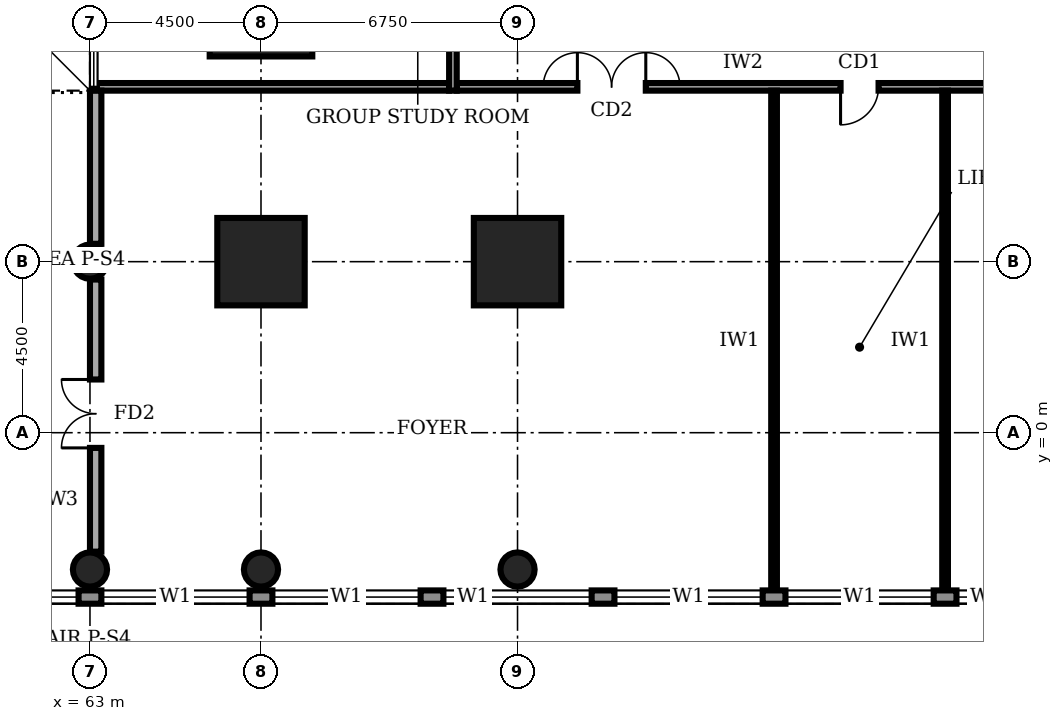
"""IFC4 building model, lengths in metres.
Left out: names, types, materials, properties, quantities, classifications, styles, units other than length and angle.
Written with IfcOpenShell. Run it as: python <this file> out.ifc"""

import sys

from ifc_helpers import new_model, si_unit, direction, frame, frame_2d, origin, origin_2d, place, context, subcontext, project, spatial, rectangle, circle, extrude, element, fill, save


model = new_model("IFC4")
c1 = context("Model", 3, precision=1e-05, world=origin(), true_north=direction((0.0, 1.0)))
c2 = subcontext(c1, "Body", "Model", "MODEL_VIEW")
j1 = project(units=[si_unit("LENGTHUNIT", "METRE"), si_unit("PLANEANGLEUNIT", "RADIAN")], contexts=[c1])
p1 = place(None, origin())
s1 = spatial("IfcSite", under=j1, at=p1, CompositionType="ELEMENT")
p2 = place(p1, origin())
s2 = spatial("IfcBuilding", under=s1, at=p2, CompositionType="ELEMENT")
p3 = place(p2, frame((0.0, 0.0, 11.0)))
s3 = spatial("IfcBuildingStorey", under=s2, at=p3, CompositionType="ELEMENT", Elevation=11.0)
for number, where, z_axis, x_axis in (
    (1, (67.5, 4.5, 0.0), (0.0, 0.0, 1.0), (1.0, 0.0, 0.0)),
    (2, (74.25, 4.5, 0.0), (0.0, 0.0, 1.0), (1.0, 0.0, 0.0)),
):
    element("IfcColumn", number, at=place(p3, frame(where, z_axis=z_axis, x_axis=x_axis)), inside=s3, PredefinedType="COLUMN", context=c2, shape_type="SweptSolid", body=[
        extrude(rectangle(XDim=2.3, YDim=2.3, at=origin_2d()), origin(), (0.0, 0.0, 1.0), 5.0),
    ])
p4 = place(p3, frame((67.5, 11.25, 0.0), z_axis=(0.0, 0.0, 1.0), x_axis=(1.0, 0.0, 0.0)))
e3 = element("IfcColumn", 3, at=p4, inside=s3, PredefinedType="COLUMN", context=c2, shape_type="SweptSolid", body=[
    extrude(rectangle(XDim=2.7, YDim=2.7, at=origin_2d()), origin(), (0.0, 0.0, 1.0), 5.0),
])
for number, where, z_axis, x_axis in (
    (4, (63.0, -3.6, 0.0), (0.0, 0.0, 1.0), (1.0, 0.0, 0.0)),
    (5, (67.5, -3.6, 0.0), (0.0, 0.0, 1.0), (1.0, 0.0, 0.0)),
    (6, (74.25, -3.6, 0.0), (0.0, 0.0, 1.0), (1.0, 0.0, 0.0)),
    (7, (63.0, 4.5, 0.0), (0.0, 0.0, 1.0), (1.0, 0.0, 0.0)),
):
    element("IfcColumn", number, at=place(p3, frame(where, z_axis=z_axis, x_axis=x_axis)), inside=s3, PredefinedType="COLUMN", context=c2, shape_type="SweptSolid", body=[
        extrude(circle(Radius=0.45, at=origin_2d()), origin(), (0.0, 0.0, 1.0), 5.0),
    ])
p5 = place(p3, frame((0.02, -4.325, 0.0), z_axis=(0.0, 0.0, 1.0), x_axis=(1.0, 0.0, 0.0)))
e8 = element("IfcWall", 8, at=p5, inside=s3, PredefinedType="STANDARD", context=c2, shape_type="SweptSolid", body=[
    extrude(rectangle(XDim=98.96, YDim=0.35, at=frame_2d((49.48, 0.0))), origin(), (0.0, 0.0, 1.0), 4.7),
])
p6 = place(p5, frame((4.78, 0.0, 0.9)))
e9 = element("IfcOpeningElement", 9, at=p6, cuts=e8, PredefinedType="OPENING", context=c2, shape_type="SweptSolid", body=[
    extrude(rectangle(XDim=3.9, YDim=2.2, at=frame_2d((1.95, 1.1))), frame((0.0, 0.185, 0.0), z_axis=(0.0, -1.0, 0.0), x_axis=(1.0, 0.0, 0.0)), (0.0, 0.0, 1.0), 0.37),
])
p7 = place(p5, frame((9.28, 0.0, 0.9)))
e10 = element("IfcOpeningElement", 10, at=p7, cuts=e8, PredefinedType="OPENING", context=c2, shape_type="SweptSolid", body=[
    extrude(rectangle(XDim=3.9, YDim=2.2, at=frame_2d((1.95, 1.1))), frame((0.0, 0.185, 0.0), z_axis=(0.0, -1.0, 0.0), x_axis=(1.0, 0.0, 0.0)), (0.0, 0.0, 1.0), 0.37),
])
p8 = place(p5, frame((13.78, 0.0, 0.9)))
e11 = element("IfcOpeningElement", 11, at=p8, cuts=e8, PredefinedType="OPENING", context=c2, shape_type="SweptSolid", body=[
    extrude(rectangle(XDim=3.9, YDim=2.2, at=frame_2d((1.95, 1.1))), frame((0.0, 0.185, 0.0), z_axis=(0.0, -1.0, 0.0), x_axis=(1.0, 0.0, 0.0)), (0.0, 0.0, 1.0), 0.37),
])
p9 = place(p5, frame((18.28, 0.0, 0.9)))
e12 = element("IfcOpeningElement", 12, at=p9, cuts=e8, PredefinedType="OPENING", context=c2, shape_type="SweptSolid", body=[
    extrude(rectangle(XDim=3.9, YDim=2.2, at=frame_2d((1.95, 1.1))), frame((0.0, 0.185, 0.0), z_axis=(0.0, -1.0, 0.0), x_axis=(1.0, 0.0, 0.0)), (0.0, 0.0, 1.0), 0.37),
])
p10 = place(p5, frame((22.78, 0.0, 0.9)))
e13 = element("IfcOpeningElement", 13, at=p10, cuts=e8, PredefinedType="OPENING", context=c2, shape_type="SweptSolid", body=[
    extrude(rectangle(XDim=3.9, YDim=2.2, at=frame_2d((1.95, 1.1))), frame((0.0, 0.185, 0.0), z_axis=(0.0, -1.0, 0.0), x_axis=(1.0, 0.0, 0.0)), (0.0, 0.0, 1.0), 0.37),
])
p11 = place(p5, frame((27.28, 0.0, 0.9)))
e14 = element("IfcOpeningElement", 14, at=p11, cuts=e8, PredefinedType="OPENING", context=c2, shape_type="SweptSolid", body=[
    extrude(rectangle(XDim=3.9, YDim=2.2, at=frame_2d((1.95, 1.1))), frame((0.0, 0.185, 0.0), z_axis=(0.0, -1.0, 0.0), x_axis=(1.0, 0.0, 0.0)), (0.0, 0.0, 1.0), 0.37),
])
p12 = place(p5, frame((31.78, 0.0, 0.9)))
e15 = element("IfcOpeningElement", 15, at=p12, cuts=e8, PredefinedType="OPENING", context=c2, shape_type="SweptSolid", body=[
    extrude(rectangle(XDim=3.9, YDim=2.2, at=frame_2d((1.95, 1.1))), frame((0.0, 0.185, 0.0), z_axis=(0.0, -1.0, 0.0), x_axis=(1.0, 0.0, 0.0)), (0.0, 0.0, 1.0), 0.37),
])
p13 = place(p5, frame((36.28, 0.0, 0.9)))
e16 = element("IfcOpeningElement", 16, at=p13, cuts=e8, PredefinedType="OPENING", context=c2, shape_type="SweptSolid", body=[
    extrude(rectangle(XDim=3.9, YDim=2.2, at=frame_2d((1.95, 1.1))), frame((0.0, 0.185, 0.0), z_axis=(0.0, -1.0, 0.0), x_axis=(1.0, 0.0, 0.0)), (0.0, 0.0, 1.0), 0.37),
])
p14 = place(p5, frame((40.78, 0.0, 0.9)))
e17 = element("IfcOpeningElement", 17, at=p14, cuts=e8, PredefinedType="OPENING", context=c2, shape_type="SweptSolid", body=[
    extrude(rectangle(XDim=3.9, YDim=2.2, at=frame_2d((1.95, 1.1))), frame((0.0, 0.185, 0.0), z_axis=(0.0, -1.0, 0.0), x_axis=(1.0, 0.0, 0.0)), (0.0, 0.0, 1.0), 0.37),
])
p15 = place(p5, frame((45.28, 0.0, 0.9)))
e18 = element("IfcOpeningElement", 18, at=p15, cuts=e8, PredefinedType="OPENING", context=c2, shape_type="SweptSolid", body=[
    extrude(rectangle(XDim=3.9, YDim=2.2, at=frame_2d((1.95, 1.1))), frame((0.0, 0.185, 0.0), z_axis=(0.0, -1.0, 0.0), x_axis=(1.0, 0.0, 0.0)), (0.0, 0.0, 1.0), 0.37),
])
p16 = place(p5, frame((49.78, 0.0, 0.9)))
e19 = element("IfcOpeningElement", 19, at=p16, cuts=e8, PredefinedType="OPENING", context=c2, shape_type="SweptSolid", body=[
    extrude(rectangle(XDim=3.9, YDim=2.2, at=frame_2d((1.95, 1.1))), frame((0.0, 0.185, 0.0), z_axis=(0.0, -1.0, 0.0), x_axis=(1.0, 0.0, 0.0)), (0.0, 0.0, 1.0), 0.37),
])
p17 = place(p5, frame((54.28, 0.0, 0.9)))
e20 = element("IfcOpeningElement", 20, at=p17, cuts=e8, PredefinedType="OPENING", context=c2, shape_type="SweptSolid", body=[
    extrude(rectangle(XDim=3.9, YDim=2.2, at=frame_2d((1.95, 1.1))), frame((0.0, 0.185, 0.0), z_axis=(0.0, -1.0, 0.0), x_axis=(1.0, 0.0, 0.0)), (0.0, 0.0, 1.0), 0.37),
])
p18 = place(p5, frame((58.78, 0.0, 0.9)))
e21 = element("IfcOpeningElement", 21, at=p18, cuts=e8, PredefinedType="OPENING", context=c2, shape_type="SweptSolid", body=[
    extrude(rectangle(XDim=3.9, YDim=2.2, at=frame_2d((1.95, 1.1))), frame((0.0, 0.185, 0.0), z_axis=(0.0, -1.0, 0.0), x_axis=(1.0, 0.0, 0.0)), (0.0, 0.0, 1.0), 0.37),
])
p19 = place(p5, frame((63.28, 0.0, 0.9)))
e22 = element("IfcOpeningElement", 22, at=p19, cuts=e8, PredefinedType="OPENING", context=c2, shape_type="SweptSolid", body=[
    extrude(rectangle(XDim=3.9, YDim=2.2, at=frame_2d((1.95, 1.1))), frame((0.0, 0.185, 0.0), z_axis=(0.0, -1.0, 0.0), x_axis=(1.0, 0.0, 0.0)), (0.0, 0.0, 1.0), 0.37),
])
p20 = place(p5, frame((67.78, 0.0, 0.9)))
e23 = element("IfcOpeningElement", 23, at=p20, cuts=e8, PredefinedType="OPENING", context=c2, shape_type="SweptSolid", body=[
    extrude(rectangle(XDim=3.9, YDim=2.2, at=frame_2d((1.95, 1.1))), frame((0.0, 0.185, 0.0), z_axis=(0.0, -1.0, 0.0), x_axis=(1.0, 0.0, 0.0)), (0.0, 0.0, 1.0), 0.37),
])
p21 = place(p5, frame((72.28, 0.0, 0.9)))
e24 = element("IfcOpeningElement", 24, at=p21, cuts=e8, PredefinedType="OPENING", context=c2, shape_type="SweptSolid", body=[
    extrude(rectangle(XDim=3.9, YDim=2.2, at=frame_2d((1.95, 1.1))), frame((0.0, 0.185, 0.0), z_axis=(0.0, -1.0, 0.0), x_axis=(1.0, 0.0, 0.0)), (0.0, 0.0, 1.0), 0.37),
])
p22 = place(p5, frame((76.78, 0.0, 0.9)))
e25 = element("IfcOpeningElement", 25, at=p22, cuts=e8, PredefinedType="OPENING", context=c2, shape_type="SweptSolid", body=[
    extrude(rectangle(XDim=3.9, YDim=2.2, at=frame_2d((1.95, 1.1))), frame((0.0, 0.185, 0.0), z_axis=(0.0, -1.0, 0.0), x_axis=(1.0, 0.0, 0.0)), (0.0, 0.0, 1.0), 0.37),
])
p23 = place(p5, frame((81.28, 0.0, 0.9)))
e26 = element("IfcOpeningElement", 26, at=p23, cuts=e8, PredefinedType="OPENING", context=c2, shape_type="SweptSolid", body=[
    extrude(rectangle(XDim=3.9, YDim=2.2, at=frame_2d((1.95, 1.1))), frame((0.0, 0.185, 0.0), z_axis=(0.0, -1.0, 0.0), x_axis=(1.0, 0.0, 0.0)), (0.0, 0.0, 1.0), 0.37),
])
p24 = place(p5, frame((85.78, 0.0, 0.9)))
e27 = element("IfcOpeningElement", 27, at=p24, cuts=e8, PredefinedType="OPENING", context=c2, shape_type="SweptSolid", body=[
    extrude(rectangle(XDim=3.9, YDim=2.2, at=frame_2d((1.95, 1.1))), frame((0.0, 0.185, 0.0), z_axis=(0.0, -1.0, 0.0), x_axis=(1.0, 0.0, 0.0)), (0.0, 0.0, 1.0), 0.37),
])
p25 = place(p5, frame((90.28, 0.0, 0.9)))
e28 = element("IfcOpeningElement", 28, at=p25, cuts=e8, PredefinedType="OPENING", context=c2, shape_type="SweptSolid", body=[
    extrude(rectangle(XDim=3.9, YDim=2.2, at=frame_2d((1.95, 1.1))), frame((0.0, 0.185, 0.0), z_axis=(0.0, -1.0, 0.0), x_axis=(1.0, 0.0, 0.0)), (0.0, 0.0, 1.0), 0.37),
])
p26 = place(p5, frame((94.71, 0.0, 0.9)))
e29 = element("IfcOpeningElement", 29, at=p26, cuts=e8, PredefinedType="OPENING", context=c2, shape_type="SweptSolid", body=[
    extrude(rectangle(XDim=3.9, YDim=2.2, at=frame_2d((1.95, 1.1))), frame((0.0, 0.185, 0.0), z_axis=(0.0, -1.0, 0.0), x_axis=(1.0, 0.0, 0.0)), (0.0, 0.0, 1.0), 0.37),
])
p27 = place(p3, frame((72.65, 9.1, 0.0), z_axis=(0.0, 0.0, 1.0), x_axis=(1.0, 0.0, 0.0)))
e30 = element("IfcWall", 30, at=p27, inside=s3, PredefinedType="SOLIDWALL", context=c2, shape_type="SweptSolid", body=[
    extrude(rectangle(XDim=16.9, YDim=0.2, at=frame_2d((8.45, 0.0))), origin(), (0.0, 0.0, 1.0), 4.7),
])
p28 = place(p27, frame((3.175, 0.0, 0.0)))
e31 = element("IfcOpeningElement", 31, at=p28, cuts=e30, PredefinedType="OPENING", context=c2, shape_type="SweptSolid", body=[
    extrude(rectangle(XDim=1.8, YDim=2.1, at=frame_2d((0.9, 1.05))), frame((0.0, 0.11, 0.0), z_axis=(0.0, -1.0, 0.0), x_axis=(1.0, 0.0, 0.0)), (0.0, 0.0, 1.0), 0.22),
])
p29 = place(p27, frame((10.1, 0.0, 0.0)))
e32 = element("IfcOpeningElement", 32, at=p29, cuts=e30, PredefinedType="OPENING", context=c2, shape_type="SweptSolid", body=[
    extrude(rectangle(XDim=1.0, YDim=2.1, at=frame_2d((0.5, 1.05))), frame((0.0, 0.11, 0.0), z_axis=(0.0, -1.0, 0.0), x_axis=(1.0, 0.0, 0.0)), (0.0, 0.0, 1.0), 0.22),
])
p30 = place(p27, frame((13.975, 0.0, 0.0)))
e33 = element("IfcOpeningElement", 33, at=p30, cuts=e30, PredefinedType="OPENING", context=c2, shape_type="SweptSolid", body=[
    extrude(rectangle(XDim=1.8, YDim=2.1, at=frame_2d((0.9, 1.05))), frame((0.0, 0.11, 0.0), z_axis=(0.0, -1.0, 0.0), x_axis=(1.0, 0.0, 0.0)), (0.0, 0.0, 1.0), 0.22),
])
p31 = place(p3, frame((72.55, 31.3, 0.0), z_axis=(0.0, 0.0, 1.0), x_axis=(0.0, -1.0, 0.0)))
e34 = element("IfcWall", 34, at=p31, inside=s3, PredefinedType="SOLIDWALL", context=c2, shape_type="SweptSolid", body=[
    extrude(rectangle(XDim=22.3, YDim=0.2, at=frame_2d((11.15, 0.0))), origin(), (0.0, 0.0, 1.0), 4.7),
])
p32 = place(p31, frame((19.55, 0.0, 0.0)))
e35 = element("IfcOpeningElement", 35, at=p32, cuts=e34, PredefinedType="OPENING", context=c2, shape_type="SweptSolid", body=[
    extrude(rectangle(XDim=1.0, YDim=2.1, at=frame_2d((0.5, 1.05))), frame((0.0, 0.11, 0.0), z_axis=(0.0, -1.0, 0.0), x_axis=(1.0, 0.0, 0.0)), (0.0, 0.0, 1.0), 0.22),
])
p33 = place(p31, frame((15.05, 0.0, 0.0)))
e36 = element("IfcOpeningElement", 36, at=p33, cuts=e34, PredefinedType="OPENING", context=c2, shape_type="SweptSolid", body=[
    extrude(rectangle(XDim=1.0, YDim=2.1, at=frame_2d((0.5, 1.05))), frame((0.0, 0.11, 0.0), z_axis=(0.0, -1.0, 0.0), x_axis=(1.0, 0.0, 0.0)), (0.0, 0.0, 1.0), 0.22),
])
p34 = place(p31, frame((8.3, 0.0, 0.0)))
e37 = element("IfcOpeningElement", 37, at=p34, cuts=e34, PredefinedType="OPENING", context=c2, shape_type="SweptSolid", body=[
    extrude(rectangle(XDim=1.0, YDim=2.1, at=frame_2d((0.5, 1.05))), frame((0.0, 0.11, 0.0), z_axis=(0.0, -1.0, 0.0), x_axis=(1.0, 0.0, 0.0)), (0.0, 0.0, 1.0), 0.22),
])
p35 = place(p31, frame((1.55, 0.0, 0.0)))
e38 = element("IfcOpeningElement", 38, at=p35, cuts=e34, PredefinedType="OPENING", context=c2, shape_type="SweptSolid", body=[
    extrude(rectangle(XDim=1.0, YDim=2.1, at=frame_2d((0.5, 1.05))), frame((0.0, 0.11, 0.0), z_axis=(0.0, -1.0, 0.0), x_axis=(1.0, 0.0, 0.0)), (0.0, 0.0, 1.0), 0.22),
])
p36 = place(p3, frame((63.18, 9.1, 0.0), z_axis=(0.0, 0.0, 1.0), x_axis=(1.0, 0.0, 0.0)))
e39 = element("IfcWall", 39, at=p36, inside=s3, PredefinedType="SOLIDWALL", context=c2, shape_type="SweptSolid", body=[
    extrude(rectangle(XDim=9.27, YDim=0.2, at=frame_2d((4.635, 0.0))), origin(), (0.0, 0.0, 1.0), 4.7),
])
for number, where, z_axis, x_axis in (
    (40, (81.0, -4.2, 0.0), (0.0, 0.0, 1.0), (0.0, 1.0, 0.0)),
    (41, (85.5, -4.2, 0.0), (0.0, 0.0, 1.0), (0.0, 1.0, 0.0)),
):
    element("IfcWall", number, at=place(p3, frame(where, z_axis=z_axis, x_axis=x_axis)), inside=s3, PredefinedType="PARTITIONING", context=c2, shape_type="SweptSolid", body=[
        extrude(rectangle(XDim=13.2, YDim=0.15, at=frame_2d((6.6, 0.0))), origin(), (0.0, 0.0, 1.0), 4.7),
    ])
p37 = place(p3, frame((63.15, -3.13, 0.0), z_axis=(0.0, 0.0, 1.0), x_axis=(0.0, 1.0, 0.0)))
e42 = element("IfcWall", 42, at=p37, inside=s3, PredefinedType="SOLIDWALL", context=c2, shape_type="SweptSolid", body=[
    extrude(rectangle(XDim=7.16, YDim=0.3, at=frame_2d((3.58, 0.0))), origin(), (0.0, 0.0, 1.0), 3.7),
])
p38 = place(p37, frame((2.73, 0.0, 0.0)))
e43 = element("IfcOpeningElement", 43, at=p38, cuts=e42, PredefinedType="OPENING", context=c2, shape_type="SweptSolid", body=[
    extrude(rectangle(XDim=1.8, YDim=2.1, at=frame_2d((0.9, 1.05))), frame((0.0, 0.16, 0.0), z_axis=(0.0, -1.0, 0.0), x_axis=(1.0, 0.0, 0.0)), (0.0, 0.0, 1.0), 0.32),
])
p39 = place(p3, frame((63.15, 4.97, 0.0), z_axis=(0.0, 0.0, 1.0), x_axis=(0.0, 1.0, 0.0)))
e44 = element("IfcWall", 44, at=p39, inside=s3, PredefinedType="SOLIDWALL", context=c2, shape_type="SweptSolid", body=[
    extrude(rectangle(XDim=4.03, YDim=0.3, at=frame_2d((2.015, 0.0))), origin(), (0.0, 0.0, 1.0), 4.7),
])
p40 = place(p18, origin())
e45 = element("IfcWindow", 45, at=p40, inside=s3, PartitioningType="SINGLE_PANEL", PredefinedType="WINDOW", context=c2, shape_type="SweptSolid", body=[
    extrude(rectangle(XDim=3.9, YDim=2.2, at=frame_2d((1.95, 1.1))), frame((0.0, 0.03, 0.0), z_axis=(0.0, -1.0, 0.0), x_axis=(1.0, 0.0, 0.0)), (0.0, 0.0, 1.0), 0.06),
])
fill(e21, e45)
p41 = place(p19, origin())
e46 = element("IfcWindow", 46, at=p41, inside=s3, PartitioningType="SINGLE_PANEL", PredefinedType="WINDOW", context=c2, shape_type="SweptSolid", body=[
    extrude(rectangle(XDim=3.9, YDim=2.2, at=frame_2d((1.95, 1.1))), frame((0.0, 0.03, 0.0), z_axis=(0.0, -1.0, 0.0), x_axis=(1.0, 0.0, 0.0)), (0.0, 0.0, 1.0), 0.06),
])
fill(e22, e46)
p42 = place(p20, origin())
e47 = element("IfcWindow", 47, at=p42, inside=s3, PartitioningType="SINGLE_PANEL", PredefinedType="WINDOW", context=c2, shape_type="SweptSolid", body=[
    extrude(rectangle(XDim=3.9, YDim=2.2, at=frame_2d((1.95, 1.1))), frame((0.0, 0.03, 0.0), z_axis=(0.0, -1.0, 0.0), x_axis=(1.0, 0.0, 0.0)), (0.0, 0.0, 1.0), 0.06),
])
fill(e23, e47)
p43 = place(p21, origin())
e48 = element("IfcWindow", 48, at=p43, inside=s3, PartitioningType="SINGLE_PANEL", PredefinedType="WINDOW", context=c2, shape_type="SweptSolid", body=[
    extrude(rectangle(XDim=3.9, YDim=2.2, at=frame_2d((1.95, 1.1))), frame((0.0, 0.03, 0.0), z_axis=(0.0, -1.0, 0.0), x_axis=(1.0, 0.0, 0.0)), (0.0, 0.0, 1.0), 0.06),
])
fill(e24, e48)
p44 = place(p22, origin())
e49 = element("IfcWindow", 49, at=p44, inside=s3, PartitioningType="SINGLE_PANEL", PredefinedType="WINDOW", context=c2, shape_type="SweptSolid", body=[
    extrude(rectangle(XDim=3.9, YDim=2.2, at=frame_2d((1.95, 1.1))), frame((0.0, 0.03, 0.0), z_axis=(0.0, -1.0, 0.0), x_axis=(1.0, 0.0, 0.0)), (0.0, 0.0, 1.0), 0.06),
])
fill(e25, e49)
p45 = place(p23, origin())
e50 = element("IfcWindow", 50, at=p45, inside=s3, PartitioningType="SINGLE_PANEL", PredefinedType="WINDOW", context=c2, shape_type="SweptSolid", body=[
    extrude(rectangle(XDim=3.9, YDim=2.2, at=frame_2d((1.95, 1.1))), frame((0.0, 0.03, 0.0), z_axis=(0.0, -1.0, 0.0), x_axis=(1.0, 0.0, 0.0)), (0.0, 0.0, 1.0), 0.06),
])
fill(e26, e50)
p46 = place(p24, origin())
e51 = element("IfcWindow", 51, at=p46, inside=s3, PartitioningType="SINGLE_PANEL", PredefinedType="WINDOW", context=c2, shape_type="SweptSolid", body=[
    extrude(rectangle(XDim=3.9, YDim=2.2, at=frame_2d((1.95, 1.1))), frame((0.0, 0.03, 0.0), z_axis=(0.0, -1.0, 0.0), x_axis=(1.0, 0.0, 0.0)), (0.0, 0.0, 1.0), 0.06),
])
fill(e27, e51)
p47 = place(p28, origin())
e52 = element("IfcDoor", 52, at=p47, inside=s3, OperationType="DOUBLE_DOOR_SINGLE_SWING", PredefinedType="DOOR", context=c2, shape_type="SweptSolid", body=[
    extrude(rectangle(XDim=1.8, YDim=2.1, at=frame_2d((0.9, 1.05))), frame((0.0, 0.025, 0.0), z_axis=(0.0, -1.0, 0.0), x_axis=(1.0, 0.0, 0.0)), (0.0, 0.0, 1.0), 0.05),
])
fill(e31, e52)
p48 = place(p29, frame((1.0, 0.0, 0.0), z_axis=(0.0, 0.0, 1.0), x_axis=(-1.0, 0.0, 0.0)))
e53 = element("IfcDoor", 53, at=p48, inside=s3, OperationType="SINGLE_SWING_RIGHT", PredefinedType="DOOR", context=c2, shape_type="SweptSolid", body=[
    extrude(rectangle(XDim=1.0, YDim=2.1, at=frame_2d((0.5, 1.05))), frame((0.0, 0.025, 0.0), z_axis=(0.0, -1.0, 0.0), x_axis=(1.0, 0.0, 0.0)), (0.0, 0.0, 1.0), 0.05),
])
fill(e32, e53)
p49 = place(p38, origin())
e54 = element("IfcDoor", 54, at=p49, inside=s3, OperationType="DOUBLE_DOOR_SINGLE_SWING", PredefinedType="DOOR", context=c2, shape_type="SweptSolid", body=[
    extrude(rectangle(XDim=1.8, YDim=2.1, at=frame_2d((0.9, 1.05))), frame((0.0, 0.025, 0.0), z_axis=(0.0, -1.0, 0.0), x_axis=(1.0, 0.0, 0.0)), (0.0, 0.0, 1.0), 0.05),
])
fill(e43, e54)
save(model, sys.argv[1])
